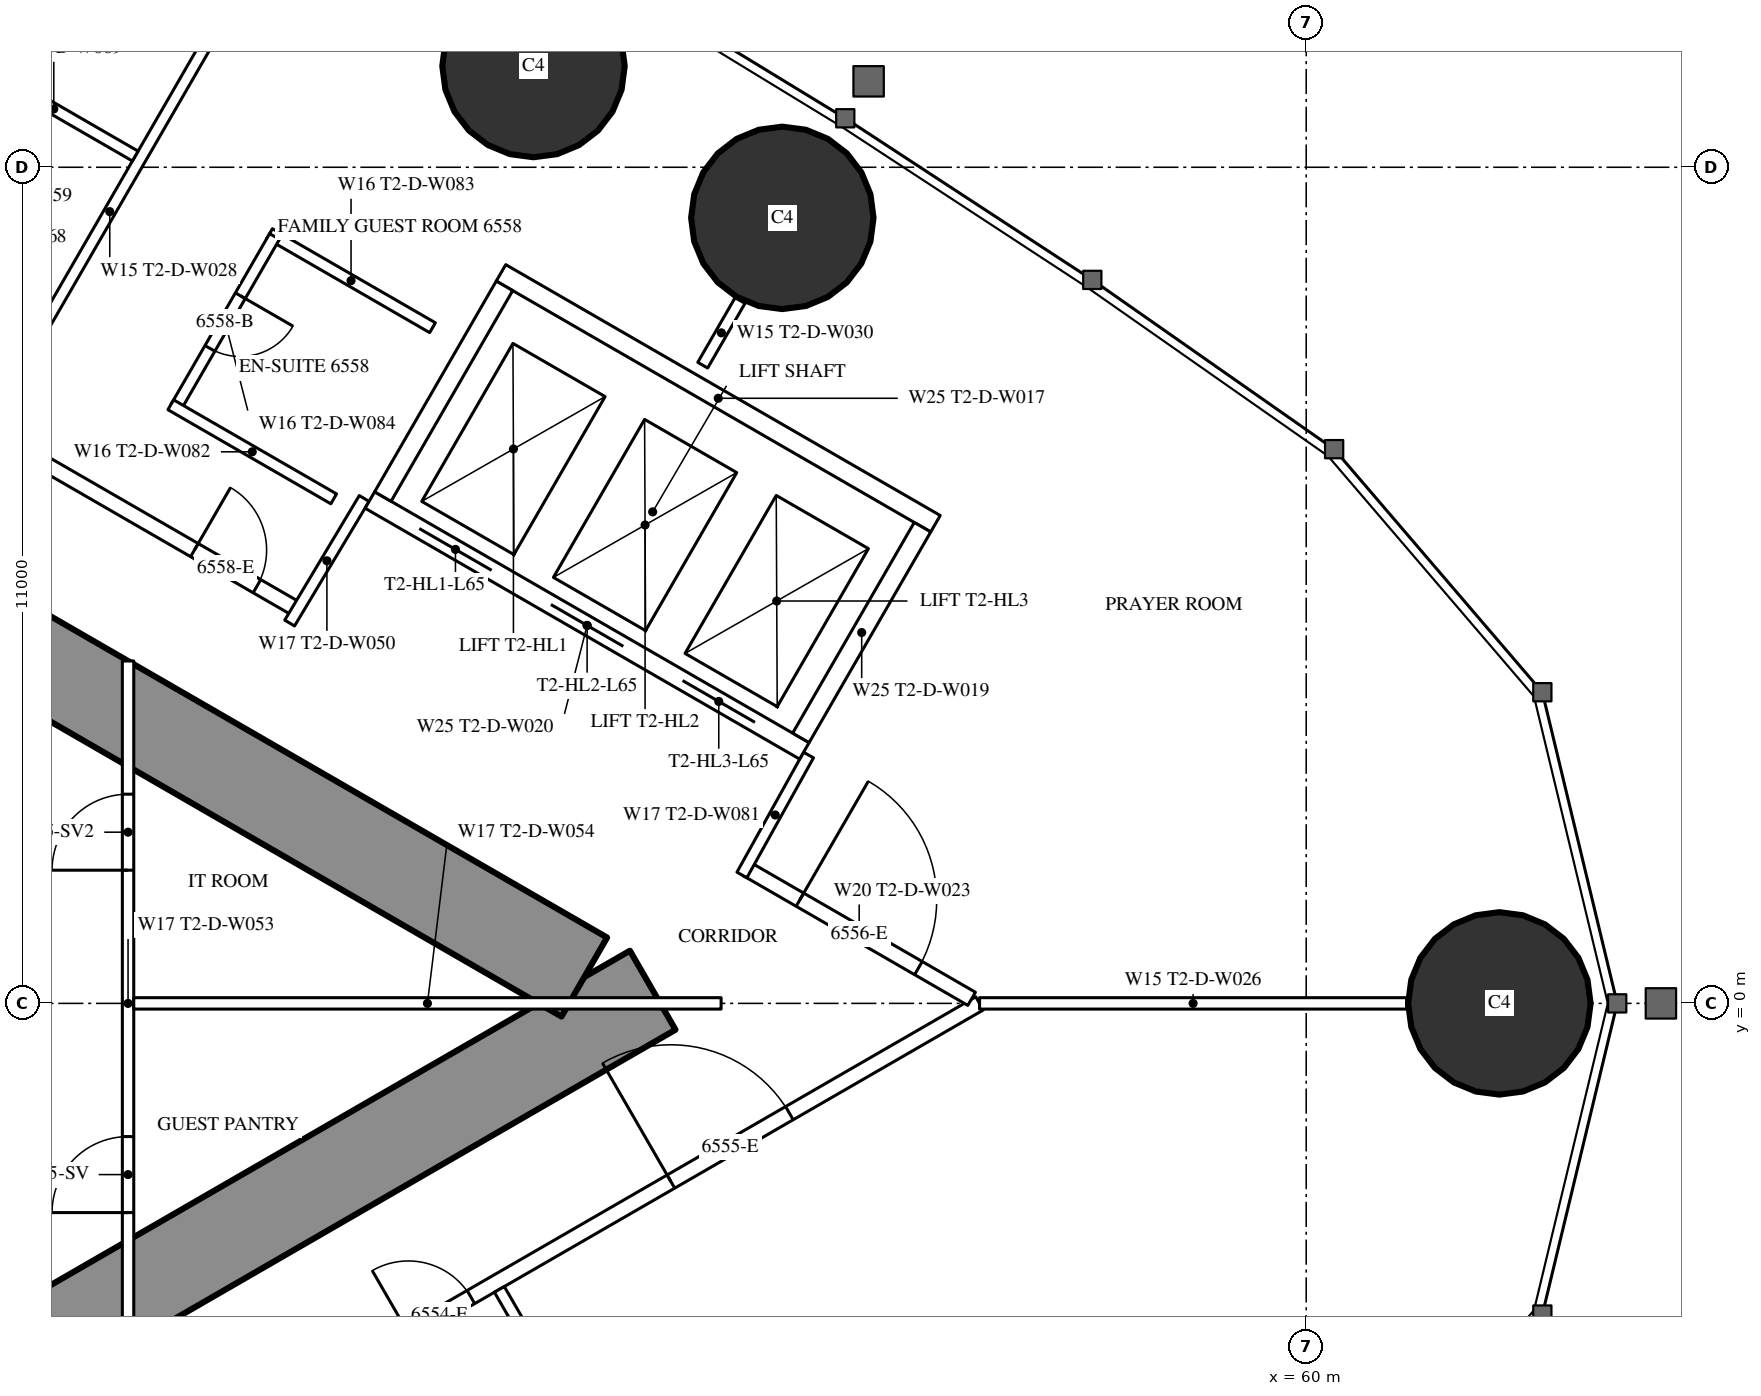
"""IFC4 building model, lengths in metres.
Left out: names, types, materials, properties, quantities, classifications, styles, units other than length and angle.
Written with IfcOpenShell. Run it as: python <this file> out.ifc"""

import sys

from ifc_helpers import new_model, si_unit, direction, frame, frame_2d, origin, origin_2d, place, context, subcontext, project, spatial, rectangle, circle, extrude, element, fill, save


model = new_model("IFC4")
c1 = context("Model", 3, precision=1e-05, world=origin(), true_north=direction((0.0, 1.0)))
c2 = subcontext(c1, "Body", "Model", "MODEL_VIEW")
j1 = project(units=[si_unit("LENGTHUNIT", "METRE"), si_unit("PLANEANGLEUNIT", "RADIAN")], contexts=[c1])
p1 = place(None, origin())
s1 = spatial("IfcSite", under=j1, at=p1, CompositionType="ELEMENT")
p2 = place(p1, origin())
s2 = spatial("IfcBuilding", under=s1, at=p2, CompositionType="ELEMENT")
p3 = place(p2, frame((0.0, 0.0, 244.1)))
s3 = spatial("IfcBuildingStorey", under=s2, at=p3, CompositionType="ELEMENT", Elevation=244.1)
for number, where, z_axis, x_axis in (
    (1, (62.542, 0.0, 0.0), (0.0, 0.0, 1.0), (1.0, 0.0, 0.0)),
    (2, (53.108, 10.334, 0.0), (0.0, 0.0, 1.0), (1.0, 0.0, 0.0)),
    (3, (49.834, 12.332, 0.0), (0.0, 0.0, 1.0), (1.0, 0.0, 0.0)),
):
    element("IfcColumn", number, at=place(p3, frame(where, z_axis=z_axis, x_axis=x_axis)), inside=s3, PredefinedType="COLUMN", context=c2, shape_type="SweptSolid", body=[
        extrude(circle(Radius=1.2, at=origin_2d()), origin(), (0.0, 0.0, 1.0), 3.6),
    ])
p4 = place(p3, frame((27.2, -13.8, 0.0), z_axis=(0.0, 0.0, 1.0), x_axis=(0.866027159892, 0.499996958321, 0.0)))
e4 = element("IfcWall", 4, at=p4, inside=s3, PredefinedType="SHEAR", context=c2, shape_type="SweptSolid", body=[
    extrude(rectangle(XDim=27.947, YDim=1.2, at=frame_2d((13.973, 0.0))), origin(), (0.0, 0.0, 1.0), 3.6),
])
p5 = place(p4, frame((4.6, 0.0, 0.0)))
e5 = element("IfcOpeningElement", 5, at=p5, cuts=e4, PredefinedType="OPENING", context=c2, shape_type="SweptSolid", body=[
    extrude(rectangle(XDim=1.0, YDim=2.2, at=frame_2d((0.5, 1.1))), frame((0.0, 0.61, 0.0), z_axis=(0.0, -1.0, 0.0), x_axis=(1.0, 0.0, 0.0)), (0.0, 0.0, 1.0), 1.22),
])
p6 = place(p4, frame((13.395, 0.0, 0.0)))
e6 = element("IfcOpeningElement", 6, at=p6, cuts=e4, PredefinedType="OPENING", context=c2, shape_type="SweptSolid", body=[
    extrude(rectangle(XDim=1.8, YDim=2.2, at=frame_2d((0.9, 1.1))), frame((0.0, 0.61, 0.0), z_axis=(0.0, -1.0, 0.0), x_axis=(1.0, 0.0, 0.0)), (0.0, 0.0, 1.0), 1.22),
])
p7 = place(p3, frame((27.2, 13.8, 0.0), z_axis=(0.0, 0.0, 1.0), x_axis=(0.866024515034, -0.500001539357, 0.0)))
e7 = element("IfcWall", 7, at=p7, inside=s3, PredefinedType="SHEAR", context=c2, shape_type="SweptSolid", body=[
    extrude(rectangle(XDim=26.907, YDim=1.2, at=frame_2d((13.454, 0.0))), origin(), (0.0, 0.0, 1.0), 3.6),
])
p8 = place(p7, frame((4.6, 0.0, 0.0)))
e8 = element("IfcOpeningElement", 8, at=p8, cuts=e7, PredefinedType="OPENING", context=c2, shape_type="SweptSolid", body=[
    extrude(rectangle(XDim=1.0, YDim=2.2, at=frame_2d((0.5, 1.1))), frame((0.0, 0.61, 0.0), z_axis=(0.0, -1.0, 0.0), x_axis=(1.0, 0.0, 0.0)), (0.0, 0.0, 1.0), 1.22),
])
p9 = place(p7, frame((13.395, 0.0, 0.0)))
e9 = element("IfcOpeningElement", 9, at=p9, cuts=e7, PredefinedType="OPENING", context=c2, shape_type="SweptSolid", body=[
    extrude(rectangle(XDim=1.8, YDim=2.2, at=frame_2d((0.9, 1.1))), frame((0.0, 0.61, 0.0), z_axis=(0.0, -1.0, 0.0), x_axis=(1.0, 0.0, 0.0)), (0.0, 0.0, 1.0), 1.22),
])
p10 = place(p3, frame((28.959, -15.44, 0.0), z_axis=(0.0, 0.0, 1.0), x_axis=(0.866025227435, 0.500000305447, 0.0)))
e10 = element("IfcWall", 10, at=p10, inside=s3, PredefinedType="PARTITIONING", context=c2, shape_type="SweptSolid", body=[
    extrude(rectangle(XDim=30.88, YDim=0.2, at=frame_2d((15.44, 0.0))), origin(), (0.0, 0.0, 1.0), 3.35),
])
p11 = place(p10, frame((1.494, 0.0, 0.0)))
e11 = element("IfcOpeningElement", 11, at=p11, cuts=e10, PredefinedType="OPENING", context=c2, shape_type="SweptSolid", body=[
    extrude(rectangle(XDim=1.8, YDim=2.04, at=frame_2d((0.9, 1.02))), frame((0.0, 0.11, 0.0), z_axis=(0.0, -1.0, 0.0), x_axis=(1.0, 0.0, 0.0)), (0.0, 0.0, 1.0), 0.22),
])
p12 = place(p10, frame((7.687, 0.0, 0.0)))
e12 = element("IfcOpeningElement", 12, at=p12, cuts=e10, PredefinedType="OPENING", context=c2, shape_type="SweptSolid", body=[
    extrude(rectangle(XDim=1.0, YDim=2.2, at=frame_2d((0.5, 1.1))), frame((0.0, 0.11, 0.0), z_axis=(0.0, -1.0, 0.0), x_axis=(1.0, 0.0, 0.0)), (0.0, 0.0, 1.0), 0.22),
])
p13 = place(p10, frame((18.321, 0.0, 0.0)))
e13 = element("IfcOpeningElement", 13, at=p13, cuts=e10, PredefinedType="OPENING", context=c2, shape_type="SweptSolid", body=[
    extrude(rectangle(XDim=0.95, YDim=2.2, at=frame_2d((0.475, 1.1))), frame((0.0, 0.11, 0.0), z_axis=(0.0, -1.0, 0.0), x_axis=(1.0, 0.0, 0.0)), (0.0, 0.0, 1.0), 0.22),
])
p14 = place(p10, frame((22.203, 0.0, 0.0)))
e14 = element("IfcOpeningElement", 14, at=p14, cuts=e10, PredefinedType="OPENING", context=c2, shape_type="SweptSolid", body=[
    extrude(rectangle(XDim=0.95, YDim=2.2, at=frame_2d((0.475, 1.1))), frame((0.0, 0.11, 0.0), z_axis=(0.0, -1.0, 0.0), x_axis=(1.0, 0.0, 0.0)), (0.0, 0.0, 1.0), 0.22),
])
p15 = place(p10, frame((26.192, 0.0, 0.0)))
e15 = element("IfcOpeningElement", 15, at=p15, cuts=e10, PredefinedType="OPENING", context=c2, shape_type="SweptSolid", body=[
    extrude(rectangle(XDim=1.8, YDim=2.2, at=frame_2d((0.9, 1.1))), frame((0.0, 0.11, 0.0), z_axis=(0.0, -1.0, 0.0), x_axis=(1.0, 0.0, 0.0)), (0.0, 0.0, 1.0), 0.22),
])
p16 = place(p3, frame((49.385, -3.763, 0.0), z_axis=(0.0, 0.0, 1.0), x_axis=(0.499999447814, -0.866025722589, 0.0)))
e16 = element("IfcWall", 16, at=p16, inside=s3, PredefinedType="PARTITIONING", context=c2, shape_type="SweptSolid", body=[
    extrude(rectangle(XDim=6.333, YDim=0.15, at=frame_2d((3.166, 0.0))), origin(), (0.0, 0.0, 1.0), 2.45),
])
p17 = place(p3, frame((42.66, 7.646, 0.0), z_axis=(0.0, 0.0, 1.0), x_axis=(0.499996592859, 0.866027370889, 0.0)))
e17 = element("IfcWall", 17, at=p17, inside=s3, PredefinedType="PARTITIONING", context=c2, shape_type="SweptSolid", body=[
    extrude(rectangle(XDim=6.398, YDim=0.15, at=frame_2d((3.199, 0.0))), origin(), (0.0, 0.0, 1.0), 2.45),
])
p18 = place(p3, frame((55.702, 0.0, 0.0), z_axis=(0.0, 0.0, 1.0), x_axis=(1.0, 0.0, 0.0)))
e18 = element("IfcWall", 18, at=p18, inside=s3, PredefinedType="PARTITIONING", context=c2, shape_type="SweptSolid", body=[
    extrude(rectangle(XDim=5.619, YDim=0.15, at=frame_2d((2.81, 0.0))), origin(), (0.0, 0.0, 1.0), 2.45),
])
p19 = place(p3, frame((52.06, 8.396, 0.0), z_axis=(0.0, 0.0, 1.0), x_axis=(0.500095379624, 0.865970329329, 0.0)))
e19 = element("IfcWall", 19, at=p19, inside=s3, PredefinedType="PARTITIONING", context=c2, shape_type="SweptSolid", body=[
    extrude(rectangle(XDim=0.982, YDim=0.15, at=frame_2d((0.491, 0.0))), origin(), (0.0, 0.0, 1.0), 3.35),
])
p20 = place(p3, frame((28.959, 15.44, 0.0), z_axis=(0.0, 0.0, 1.0), x_axis=(0.866028936079, -0.499993881836, 0.0)))
e20 = element("IfcWall", 20, at=p20, inside=s3, PredefinedType="PARTITIONING", context=c2, shape_type="SweptSolid", body=[
    extrude(rectangle(XDim=20.503, YDim=0.2, at=frame_2d((10.251, 0.0))), origin(), (0.0, 0.0, 1.0), 3.35),
])
p21 = place(p20, frame((18.953, 0.0, 0.0)))
e21 = element("IfcOpeningElement", 21, at=p21, cuts=e20, PredefinedType="OPENING", context=c2, shape_type="SweptSolid", body=[
    extrude(rectangle(XDim=0.95, YDim=2.2, at=frame_2d((0.475, 1.1))), frame((0.0, 0.11, 0.0), z_axis=(0.0, -1.0, 0.0), x_axis=(1.0, 0.0, 0.0)), (0.0, 0.0, 1.0), 0.22),
])
p22 = place(p20, frame((14.437, 0.0, 0.0)))
e22 = element("IfcOpeningElement", 22, at=p22, cuts=e20, PredefinedType="OPENING", context=c2, shape_type="SweptSolid", body=[
    extrude(rectangle(XDim=0.95, YDim=2.2, at=frame_2d((0.475, 1.1))), frame((0.0, 0.11, 0.0), z_axis=(0.0, -1.0, 0.0), x_axis=(1.0, 0.0, 0.0)), (0.0, 0.0, 1.0), 0.22),
])
p23 = place(p20, frame((2.244, 0.0, 0.0)))
e23 = element("IfcOpeningElement", 23, at=p23, cuts=e20, PredefinedType="OPENING", context=c2, shape_type="SweptSolid", body=[
    extrude(rectangle(XDim=1.8, YDim=2.04, at=frame_2d((0.9, 1.02))), frame((0.0, 0.11, 0.0), z_axis=(0.0, -1.0, 0.0), x_axis=(1.0, 0.0, 0.0)), (0.0, 0.0, 1.0), 0.22),
])
p24 = place(p3, frame((52.639, 1.769, 0.0), z_axis=(0.0, 0.0, 1.0), x_axis=(0.866027340901, -0.4999966448, 0.0)))
e24 = element("IfcWall", 24, at=p24, inside=s3, PredefinedType="PARTITIONING", context=c2, shape_type="SweptSolid", body=[
    extrude(rectangle(XDim=3.417, YDim=0.2, at=frame_2d((1.708, 0.0))), origin(), (0.0, 0.0, 1.0), 3.35),
])
p25 = place(p24, frame((0.809, 0.0, 0.0)))
e25 = element("IfcOpeningElement", 25, at=p25, cuts=e24, PredefinedType="OPENING", context=c2, shape_type="SweptSolid", body=[
    extrude(rectangle(XDim=1.8, YDim=2.2, at=frame_2d((0.9, 1.1))), frame((0.0, 0.11, 0.0), z_axis=(0.0, -1.0, 0.0), x_axis=(1.0, 0.0, 0.0)), (0.0, 0.0, 1.0), 0.22),
])
p26 = place(p3, frame((47.606, 6.642, 0.0), z_axis=(0.0, 0.0, 1.0), x_axis=(-0.51353662755, -0.858067673418, 0.0)))
e26 = element("IfcWall", 26, at=p26, inside=s3, PredefinedType="PARTITIONING", context=c2, shape_type="SweptSolid", body=[
    extrude(rectangle(XDim=1.91, YDim=0.15, at=frame_2d((0.955, 0.0))), origin(), (0.0, 0.0, 1.0), 3.35),
])
p27 = place(p3, frame((52.576, 1.689, 0.0), z_axis=(0.0, 0.0, 1.0), x_axis=(0.485482130951, 0.874246590229, 0.0)))
e27 = element("IfcWall", 27, at=p27, inside=s3, PredefinedType="PARTITIONING", context=c2, shape_type="SweptSolid", body=[
    extrude(rectangle(XDim=1.805, YDim=0.15, at=frame_2d((0.902, 0.0))), origin(), (0.0, 0.0, 1.0), 3.35),
])
p28 = place(p3, frame((46.362, 10.127, 0.0), z_axis=(0.0, 0.0, 1.0), x_axis=(0.866006523861, -0.500032699561, 0.0)))
e28 = element("IfcWall", 28, at=p28, inside=s3, PredefinedType="PARTITIONING", context=c2, shape_type="SweptSolid", body=[
    extrude(rectangle(XDim=2.475, YDim=0.15, at=frame_2d((1.237, 0.0))), origin(), (0.0, 0.0, 1.0), 3.35),
])
p29 = place(p3, frame((45.127, 7.838, 0.0), z_axis=(0.0, 0.0, 1.0), x_axis=(0.500006934395, 0.866021400173, 0.0)))
e29 = element("IfcWall", 29, at=p29, inside=s3, PredefinedType="PARTITIONING", context=c2, shape_type="SweptSolid", body=[
    extrude(rectangle(XDim=2.6, YDim=0.15, at=frame_2d((1.3, 0.0))), origin(), (0.0, 0.0, 1.0), 3.35),
])
p30 = place(p29, frame((0.9, 0.0, 0.0)))
e30 = element("IfcOpeningElement", 30, at=p30, cuts=e29, PredefinedType="OPENING", context=c2, shape_type="SweptSolid", body=[
    extrude(rectangle(XDim=0.8, YDim=2.2, at=frame_2d((0.4, 1.1))), frame((0.0, 0.085, 0.0), z_axis=(0.0, -1.0, 0.0), x_axis=(1.0, 0.0, 0.0)), (0.0, 0.0, 1.0), 0.17),
])
p31 = place(p3, frame((45.062, 7.875, 0.0), z_axis=(0.0, 0.0, 1.0), x_axis=(0.866031185235, -0.4999899861, 0.0)))
e31 = element("IfcWall", 31, at=p31, inside=s3, PredefinedType="PARTITIONING", context=c2, shape_type="SweptSolid", body=[
    extrude(rectangle(XDim=2.475, YDim=0.15, at=frame_2d((1.238, 0.0))), origin(), (0.0, 0.0, 1.0), 2.5),
])
p32 = place(p3, frame((42.451, 12.385, 0.0), z_axis=(0.0, 0.0, 1.0), x_axis=(0.866031185235, -0.4999899861, 0.0)))
e32 = element("IfcWall", 32, at=p32, inside=s3, PredefinedType="PARTITIONING", context=c2, shape_type="SweptSolid", body=[
    extrude(rectangle(XDim=2.475, YDim=0.15, at=frame_2d((1.238, 0.0))), origin(), (0.0, 0.0, 1.0), 3.35),
])
p33 = place(p3, frame((44.5, -4.505, 0.0), z_axis=(0.0, 0.0, 1.0), x_axis=(0.0, 1.0, 0.0)))
e33 = element("IfcWall", 33, at=p33, inside=s3, PredefinedType="PARTITIONING", context=c2, shape_type="SweptSolid", body=[
    extrude(rectangle(XDim=9.009, YDim=0.15, at=frame_2d((4.505, 0.0))), origin(), (0.0, 0.0, 1.0), 3.35),
])
p34 = place(p33, frame((1.752, 0.0, 0.0)))
e34 = element("IfcOpeningElement", 34, at=p34, cuts=e33, PredefinedType="OPENING", context=c2, shape_type="SweptSolid", body=[
    extrude(rectangle(XDim=1.0, YDim=2.2, at=frame_2d((0.5, 1.1))), frame((0.0, 0.085, 0.0), z_axis=(0.0, -1.0, 0.0), x_axis=(1.0, 0.0, 0.0)), (0.0, 0.0, 1.0), 0.17),
])
p35 = place(p33, frame((6.257, 0.0, 0.0)))
e35 = element("IfcOpeningElement", 35, at=p35, cuts=e33, PredefinedType="OPENING", context=c2, shape_type="SweptSolid", body=[
    extrude(rectangle(XDim=1.0, YDim=2.2, at=frame_2d((0.5, 1.1))), frame((0.0, 0.085, 0.0), z_axis=(0.0, -1.0, 0.0), x_axis=(1.0, 0.0, 0.0)), (0.0, 0.0, 1.0), 0.17),
])
p36 = place(p3, frame((44.575, 0.0, 0.0), z_axis=(0.0, 0.0, 1.0), x_axis=(1.0, 0.0, 0.0)))
e36 = element("IfcWall", 36, at=p36, inside=s3, PredefinedType="PARTITIONING", context=c2, shape_type="SweptSolid", body=[
    extrude(rectangle(XDim=7.727, YDim=0.15, at=frame_2d((3.864, 0.0))), origin(), (0.0, 0.0, 1.0), 2.45),
])
p37 = place(p3, frame((47.681, 6.622, 0.0), z_axis=(0.0, 0.0, 1.0), x_axis=(0.86603344179, -0.499986077507, 0.0)))
e37 = element("IfcWall", 37, at=p37, inside=s3, PredefinedType="PARTITIONING", context=c2, shape_type="SweptSolid", body=[
    extrude(rectangle(XDim=6.6, YDim=0.25, at=frame_2d((3.3, 0.0))), origin(), (0.0, 0.0, 1.0), 3.35),
])
p38 = place(p37, frame((0.75, 0.0, 0.0)))
e38 = element("IfcOpeningElement", 38, at=p38, cuts=e37, PredefinedType="OPENING", context=c2, shape_type="SweptSolid", body=[
    extrude(rectangle(XDim=1.1, YDim=2.2, at=frame_2d((0.55, 1.1))), frame((0.0, 0.135, 0.0), z_axis=(0.0, -1.0, 0.0), x_axis=(1.0, 0.0, 0.0)), (0.0, 0.0, 1.0), 0.27),
])
p39 = place(p37, frame((2.75, 0.0, 0.0)))
e39 = element("IfcOpeningElement", 39, at=p39, cuts=e37, PredefinedType="OPENING", context=c2, shape_type="SweptSolid", body=[
    extrude(rectangle(XDim=1.1, YDim=2.2, at=frame_2d((0.55, 1.1))), frame((0.0, 0.135, 0.0), z_axis=(0.0, -1.0, 0.0), x_axis=(1.0, 0.0, 0.0)), (0.0, 0.0, 1.0), 0.27),
])
p40 = place(p37, frame((4.75, 0.0, 0.0)))
e40 = element("IfcOpeningElement", 40, at=p40, cuts=e37, PredefinedType="OPENING", context=c2, shape_type="SweptSolid", body=[
    extrude(rectangle(XDim=1.1, YDim=2.2, at=frame_2d((0.55, 1.1))), frame((0.0, 0.135, 0.0), z_axis=(0.0, -1.0, 0.0), x_axis=(1.0, 0.0, 0.0)), (0.0, 0.0, 1.0), 0.27),
])
p41 = place(p3, frame((49.406, 9.611, 0.0), z_axis=(0.0, 0.0, 1.0), x_axis=(0.86603344179, -0.499986077507, 0.0)))
e41 = element("IfcWall", 41, at=p41, inside=s3, PredefinedType="PARTITIONING", context=c2, shape_type="SweptSolid", body=[
    extrude(rectangle(XDim=6.6, YDim=0.25, at=frame_2d((3.3, 0.0))), origin(), (0.0, 0.0, 1.0), 3.35),
])
p42 = place(p3, frame((47.852, 6.668, 0.0), z_axis=(0.0, 0.0, 1.0), x_axis=(0.499929347863, 0.866066190972, 0.0)))
e42 = element("IfcWall", 42, at=p42, inside=s3, PredefinedType="PARTITIONING", context=c2, shape_type="SweptSolid", body=[
    extrude(rectangle(XDim=3.201, YDim=0.25, at=frame_2d((1.6, 0.0))), origin(), (0.0, 0.0, 1.0), 3.35),
])
p43 = place(p3, frame((53.352, 3.493, 0.0), z_axis=(0.0, 0.0, 1.0), x_axis=(0.499872130319, 0.866099216793, 0.0)))
e43 = element("IfcWall", 43, at=p43, inside=s3, PredefinedType="PARTITIONING", context=c2, shape_type="SweptSolid", body=[
    extrude(rectangle(XDim=3.2, YDim=0.25, at=frame_2d((1.6, 0.0))), origin(), (0.0, 0.0, 1.0), 3.35),
])
p44 = place(p14, origin())
e44 = element("IfcDoor", 44, at=p44, inside=s3, OperationType="SINGLE_SWING_LEFT", PredefinedType="DOOR", context=c2, shape_type="SweptSolid", body=[
    extrude(rectangle(XDim=0.95, YDim=2.2, at=frame_2d((0.475, 1.1))), frame((0.0, 0.025, 0.0), z_axis=(0.0, -1.0, 0.0), x_axis=(1.0, 0.0, 0.0)), (0.0, 0.0, 1.0), 0.05),
])
fill(e14, e44)
p45 = place(p15, origin())
e45 = element("IfcDoor", 45, at=p45, inside=s3, OperationType="DOUBLE_DOOR_SINGLE_SWING", PredefinedType="DOOR", context=c2, shape_type="SweptSolid", body=[
    extrude(rectangle(XDim=1.8, YDim=2.2, at=frame_2d((0.9, 1.1))), frame((0.0, 0.025, 0.0), z_axis=(0.0, -1.0, 0.0), x_axis=(1.0, 0.0, 0.0)), (0.0, 0.0, 1.0), 0.05),
])
fill(e15, e45)
p46 = place(p30, origin())
e46 = element("IfcDoor", 46, at=p46, inside=s3, OperationType="SINGLE_SWING_RIGHT", PredefinedType="DOOR", context=c2, shape_type="SweptSolid", body=[
    extrude(rectangle(XDim=0.8, YDim=2.2, at=frame_2d((0.4, 1.1))), frame((0.0, 0.025, 0.0), z_axis=(0.0, -1.0, 0.0), x_axis=(1.0, 0.0, 0.0)), (0.0, 0.0, 1.0), 0.05),
])
fill(e30, e46)
p47 = place(p21, origin())
e47 = element("IfcDoor", 47, at=p47, inside=s3, OperationType="SINGLE_SWING_LEFT", PredefinedType="DOOR", context=c2, shape_type="SweptSolid", body=[
    extrude(rectangle(XDim=0.95, YDim=2.2, at=frame_2d((0.475, 1.1))), frame((0.0, 0.025, 0.0), z_axis=(0.0, -1.0, 0.0), x_axis=(1.0, 0.0, 0.0)), (0.0, 0.0, 1.0), 0.05),
])
fill(e21, e47)
p48 = place(p25, origin())
e48 = element("IfcDoor", 48, at=p48, inside=s3, OperationType="DOUBLE_DOOR_SINGLE_SWING", PredefinedType="DOOR", context=c2, shape_type="SweptSolid", body=[
    extrude(rectangle(XDim=1.8, YDim=2.2, at=frame_2d((0.9, 1.1))), frame((0.0, 0.025, 0.0), z_axis=(0.0, -1.0, 0.0), x_axis=(1.0, 0.0, 0.0)), (0.0, 0.0, 1.0), 0.05),
])
fill(e25, e48)
p49 = place(p34, origin())
e49 = element("IfcDoor", 49, at=p49, inside=s3, OperationType="SINGLE_SWING_LEFT", PredefinedType="DOOR", context=c2, shape_type="SweptSolid", body=[
    extrude(rectangle(XDim=1.0, YDim=2.2, at=frame_2d((0.5, 1.1))), frame((0.0, 0.025, 0.0), z_axis=(0.0, -1.0, 0.0), x_axis=(1.0, 0.0, 0.0)), (0.0, 0.0, 1.0), 0.05),
])
fill(e34, e49)
p50 = place(p35, origin())
e50 = element("IfcDoor", 50, at=p50, inside=s3, OperationType="SINGLE_SWING_LEFT", PredefinedType="DOOR", context=c2, shape_type="SweptSolid", body=[
    extrude(rectangle(XDim=1.0, YDim=2.2, at=frame_2d((0.5, 1.1))), frame((0.0, 0.025, 0.0), z_axis=(0.0, -1.0, 0.0), x_axis=(1.0, 0.0, 0.0)), (0.0, 0.0, 1.0), 0.05),
])
fill(e35, e50)
p51 = place(p38, origin())
e51 = element("IfcDoor", 51, at=p51, inside=s3, OperationType="DOUBLE_DOOR_SLIDING", PredefinedType="USERDEFINED", context=c2, shape_type="SweptSolid", body=[
    extrude(rectangle(XDim=1.1, YDim=2.2, at=frame_2d((0.55, 1.1))), frame((0.0, 0.025, 0.0), z_axis=(0.0, -1.0, 0.0), x_axis=(1.0, 0.0, 0.0)), (0.0, 0.0, 1.0), 0.05),
])
fill(e38, e51)
p52 = place(p39, origin())
e52 = element("IfcDoor", 52, at=p52, inside=s3, OperationType="DOUBLE_DOOR_SLIDING", PredefinedType="USERDEFINED", context=c2, shape_type="SweptSolid", body=[
    extrude(rectangle(XDim=1.1, YDim=2.2, at=frame_2d((0.55, 1.1))), frame((0.0, 0.025, 0.0), z_axis=(0.0, -1.0, 0.0), x_axis=(1.0, 0.0, 0.0)), (0.0, 0.0, 1.0), 0.05),
])
fill(e39, e52)
p53 = place(p40, origin())
e53 = element("IfcDoor", 53, at=p53, inside=s3, OperationType="DOUBLE_DOOR_SLIDING", PredefinedType="USERDEFINED", context=c2, shape_type="SweptSolid", body=[
    extrude(rectangle(XDim=1.1, YDim=2.2, at=frame_2d((0.55, 1.1))), frame((0.0, 0.025, 0.0), z_axis=(0.0, -1.0, 0.0), x_axis=(1.0, 0.0, 0.0)), (0.0, 0.0, 1.0), 0.05),
])
fill(e40, e53)
save(model, sys.argv[1])
